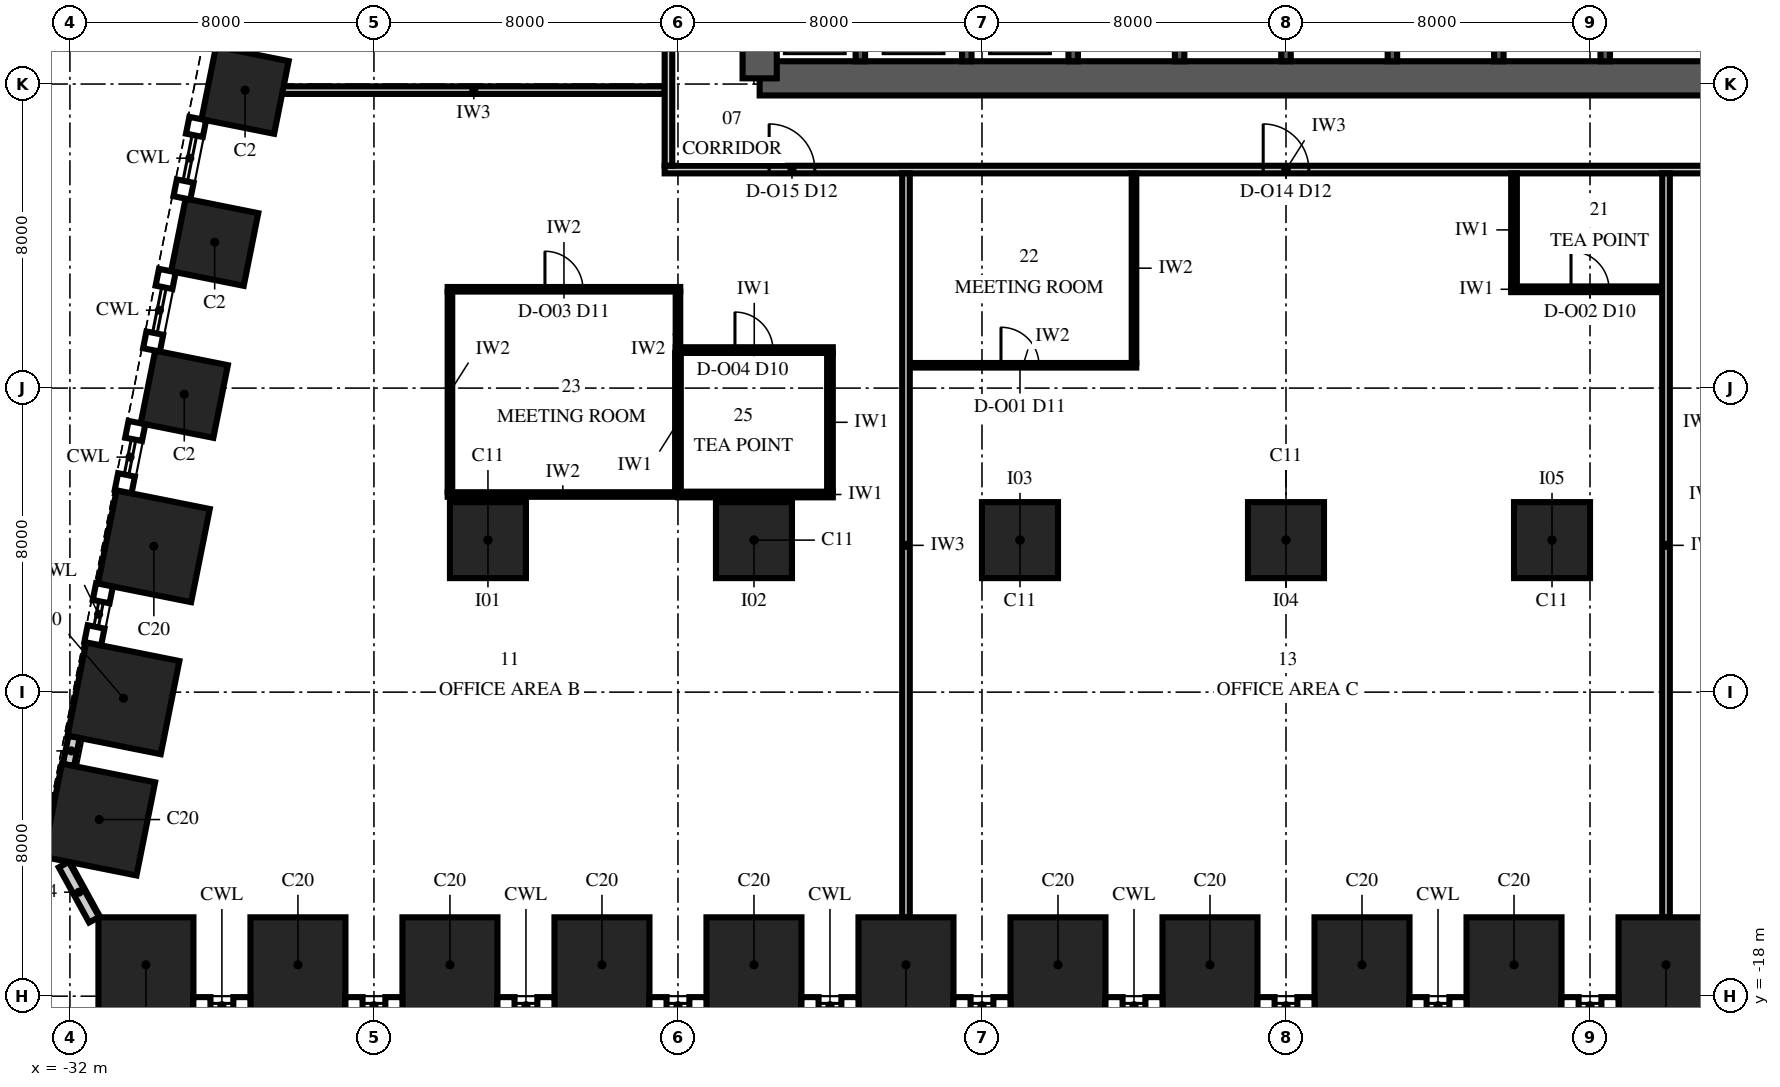
"""IFC4 building model, lengths in metres.
Left out: names, types, materials, properties, quantities, classifications, styles, units other than length and angle.
Written with IfcOpenShell. Run it as: python <this file> out.ifc"""

import sys

from ifc_helpers import new_model, si_unit, direction, frame, frame_2d, origin, origin_2d, place, context, subcontext, project, spatial, polyline, rectangle, outline, extrude, element, fill, save


model = new_model("IFC4")
c1 = context("Model", 3, precision=1e-05, world=origin(), true_north=direction((0.0, 1.0)))
c2 = subcontext(c1, "Body", "Model", "MODEL_VIEW")
j1 = project(units=[si_unit("LENGTHUNIT", "METRE"), si_unit("PLANEANGLEUNIT", "RADIAN")], contexts=[c1])
p1 = place(None, origin())
s1 = spatial("IfcSite", under=j1, at=p1, CompositionType="ELEMENT")
p2 = place(p1, origin())
s2 = spatial("IfcBuilding", under=s1, at=p2, CompositionType="ELEMENT")
p3 = place(p2, frame((0.0, 0.0, 36.0)))
s3 = spatial("IfcBuildingStorey", under=s2, at=p3, CompositionType="ELEMENT", Elevation=36.0)
for number, where, z_axis, x_axis in (
    (1, (-30.0, -17.175, 0.0), (0.0, 0.0, 1.0), (1.0, 0.0, 0.0)),
    (2, (-26.0, -17.175, 0.0), (0.0, 0.0, 1.0), (1.0, 0.0, 0.0)),
    (3, (-22.0, -17.175, 0.0), (0.0, 0.0, 1.0), (1.0, 0.0, 0.0)),
    (4, (-18.0, -17.175, 0.0), (0.0, 0.0, 1.0), (1.0, 0.0, 0.0)),
    (5, (-14.0, -17.175, 0.0), (0.0, 0.0, 1.0), (1.0, 0.0, 0.0)),
    (6, (-10.0, -17.175, 0.0), (0.0, 0.0, 1.0), (1.0, 0.0, 0.0)),
    (7, (-6.0, -17.175, 0.0), (0.0, 0.0, 1.0), (1.0, 0.0, 0.0)),
    (8, (-2.0, -17.175, 0.0), (0.0, 0.0, 1.0), (1.0, 0.0, 0.0)),
    (9, (2.0, -17.175, 0.0), (0.0, 0.0, 1.0), (1.0, 0.0, 0.0)),
    (10, (6.0, -17.175, 0.0), (0.0, 0.0, 1.0), (1.0, 0.0, 0.0)),
    (11, (10.0, -17.175, 0.0), (0.0, 0.0, 1.0), (1.0, 0.0, 0.0)),
):
    element("IfcColumn", number, at=place(p3, frame(where, z_axis=z_axis, x_axis=x_axis)), inside=s3, PredefinedType="COLUMN", context=c2, shape_type="SweptSolid", body=[
        extrude(rectangle(XDim=2.5, YDim=2.5, at=origin_2d()), origin(), (0.0, 0.0, 1.0), 4.0),
    ])
for number, where, z_axis, x_axis in (
    (12, (-27.391, 5.838, 0.0), (0.0, 0.0, 1.0), (-0.196, -0.981, 0.0)),
    (13, (-28.191, 1.838, 0.0), (0.0, 0.0, 1.0), (-0.196, -0.981, 0.0)),
    (14, (-28.991, -2.162, 0.0), (0.0, 0.0, 1.0), (-0.196, -0.981, 0.0)),
):
    element("IfcColumn", number, at=place(p3, frame(where, z_axis=z_axis, x_axis=x_axis)), inside=s3, PredefinedType="COLUMN", context=c2, shape_type="SweptSolid", body=[
        extrude(rectangle(XDim=1.95, YDim=1.95, at=origin_2d()), origin(), (0.0, 0.0, 1.0), 4.0),
    ])
for number, where, z_axis, x_axis in (
    (15, (-29.791, -6.162, 0.0), (0.0, 0.0, 1.0), (-0.196, -0.981, 0.0)),
    (16, (-30.591, -10.162, 0.0), (0.0, 0.0, 1.0), (-0.196, -0.981, 0.0)),
    (17, (-31.229, -13.353, 0.0), (0.0, 0.0, 1.0), (-0.196, -0.981, 0.0)),
):
    element("IfcColumn", number, at=place(p3, frame(where, z_axis=z_axis, x_axis=x_axis)), inside=s3, PredefinedType="COLUMN", context=c2, shape_type="SweptSolid", body=[
        extrude(rectangle(XDim=2.5, YDim=2.5, at=origin_2d()), origin(), (0.0, 0.0, 1.0), 4.0),
    ])
for number, where, z_axis, x_axis in (
    (18, (-21.0, -6.0, 0.0), (0.0, 0.0, 1.0), (1.0, 0.0, 0.0)),
    (19, (-14.0, -6.0, 0.0), (0.0, 0.0, 1.0), (1.0, 0.0, 0.0)),
    (20, (-7.0, -6.0, 0.0), (0.0, 0.0, 1.0), (1.0, 0.0, 0.0)),
    (21, (0.0, -6.0, 0.0), (0.0, 0.0, 1.0), (1.0, 0.0, 0.0)),
    (22, (7.0, -6.0, 0.0), (0.0, 0.0, 1.0), (1.0, 0.0, 0.0)),
):
    element("IfcColumn", number, at=place(p3, frame(where, z_axis=z_axis, x_axis=x_axis)), inside=s3, PredefinedType="COLUMN", context=c2, shape_type="SweptSolid", body=[
        extrude(rectangle(XDim=2.0, YDim=2.0, at=origin_2d()), origin(), (0.0, 0.0, 1.0), 4.0),
    ])
p4 = place(p3, frame((-13.85, 6.15, 0.0), z_axis=(0.0, 0.0, 1.0), x_axis=(1.0, 0.0, 0.0)))
e23 = element("IfcWall", 23, at=p4, inside=s3, PredefinedType="SHEAR", context=c2, shape_type="SweptSolid", body=[
    extrude(rectangle(XDim=27.7, YDim=0.9, at=frame_2d((13.85, 0.0))), origin(), (0.0, 0.0, 1.0), 4.0),
])
p5 = place(p3, frame((-13.85, 23.85, 0.0), z_axis=(0.0, 0.0, 1.0), x_axis=(0.0, -1.0, 0.0)))
e24 = element("IfcWall", 24, at=p5, inside=s3, PredefinedType="SHEAR", context=c2, shape_type="SweptSolid", body=[
    extrude(outline(polyline([(0.0, -0.45), (17.7, -0.45), (17.7, 0.0), (17.25, 0.0), (17.25, 0.45), (0.45, 0.45), (0.45, 0.0), (0.0, 0.0), (0.0, -0.45)])), origin(), (0.0, 0.0, 1.0), 4.0),
])
p6 = place(p5, frame((11.75, 0.0, 0.0)))
e25 = element("IfcOpeningElement", 25, at=p6, cuts=e24, PredefinedType="OPENING", context=c2, shape_type="SweptSolid", body=[
    extrude(rectangle(XDim=1.8, YDim=2.4, at=frame_2d((0.9, 1.2))), frame((0.0, 0.465, 0.0), z_axis=(0.0, -1.0, 0.0), x_axis=(1.0, 0.0, 0.0)), (0.0, 0.0, 1.0), 0.93),
])
for number, where, z_axis, x_axis in (
    (26, (-11.2, 6.6, 0.0), (0.0, 0.0, 1.0), (0.0, 1.0, 0.0)),
    (27, (-8.4, 6.6, 0.0), (0.0, 0.0, 1.0), (0.0, 1.0, 0.0)),
    (28, (-5.6, 6.6, 0.0), (0.0, 0.0, 1.0), (0.0, 1.0, 0.0)),
    (29, (-2.8, 6.6, 0.0), (0.0, 0.0, 1.0), (0.0, 1.0, 0.0)),
    (30, (0.0, 6.6, 0.0), (0.0, 0.0, 1.0), (0.0, 1.0, 0.0)),
    (31, (2.8, 6.6, 0.0), (0.0, 0.0, 1.0), (0.0, 1.0, 0.0)),
    (32, (5.6, 6.6, 0.0), (0.0, 0.0, 1.0), (0.0, 1.0, 0.0)),
    (33, (8.4, 6.6, 0.0), (0.0, 0.0, 1.0), (0.0, 1.0, 0.0)),
):
    element("IfcWall", number, at=place(p3, frame(where, z_axis=z_axis, x_axis=x_axis)), inside=s3, PredefinedType="SHEAR", context=c2, shape_type="SweptSolid", body=[
        extrude(rectangle(XDim=2.675, YDim=0.25, at=frame_2d((1.337, 0.0))), origin(), (0.0, 0.0, 1.0), 4.0),
    ])
p7 = place(p3, frame((-31.89, -11.177, 0.0), z_axis=(0.0, 0.0, 1.0), x_axis=(-0.195867092459, -0.980630451338, 0.0)))
e34 = element("IfcWall", 34, at=p7, inside=s3, PredefinedType="SOLIDWALL", context=c2, shape_type="SweptSolid", body=[
    extrude(rectangle(XDim=0.754, YDim=0.3, at=frame_2d((0.377, 0.0))), origin(), (0.0, 0.0, 1.0), 4.0),
])
p8 = place(p3, frame((-32.16, -14.539, 0.0), z_axis=(0.0, 0.0, 1.0), x_axis=(0.481879089964, -0.876237720402, 0.0)))
e35 = element("IfcWall", 35, at=p8, inside=s3, PredefinedType="SOLIDWALL", context=c2, shape_type="SweptSolid", body=[
    extrude(rectangle(XDim=1.654, YDim=0.3, at=frame_2d((0.827, 0.0))), origin(), (0.0, 0.0, 1.0), 4.0),
])
p9 = place(p3, frame((-22.06, -4.8, 0.0), z_axis=(0.0, 0.0, 1.0), x_axis=(1.0, 0.0, 0.0)))
e36 = element("IfcWall", 36, at=p9, inside=s3, PredefinedType="PARTITIONING", context=c2, shape_type="SweptSolid", body=[
    extrude(rectangle(XDim=6.06, YDim=0.12, at=frame_2d((3.03, 0.0))), origin(), (0.0, 0.0, 1.0), 3.25),
])
p10 = place(p3, frame((-16.0, -4.8, 0.0), z_axis=(0.0, 0.0, 1.0), x_axis=(1.0, 0.0, 0.0)))
e37 = element("IfcWall", 37, at=p10, inside=s3, PredefinedType="PARTITIONING", context=c2, shape_type="SweptSolid", body=[
    extrude(rectangle(XDim=4.075, YDim=0.15, at=frame_2d((2.038, 0.0))), origin(), (0.0, 0.0, 1.0), 3.25),
])
p11 = place(p3, frame((-9.9, -1.4, 0.0), z_axis=(0.0, 0.0, 1.0), x_axis=(1.0, 0.0, 0.0)))
e38 = element("IfcWall", 38, at=p11, inside=s3, PredefinedType="PARTITIONING", context=c2, shape_type="SweptSolid", body=[
    extrude(rectangle(XDim=5.96, YDim=0.12, at=frame_2d((2.98, 0.0))), origin(), (0.0, 0.0, 1.0), 3.25),
])
p12 = place(p11, frame((2.4, 0.0, 0.0)))
e39 = element("IfcOpeningElement", 39, at=p12, cuts=e38, PredefinedType="OPENING", context=c2, shape_type="SweptSolid", body=[
    extrude(rectangle(XDim=1.0, YDim=2.4, at=frame_2d((0.5, 1.2))), frame((0.0, 0.075, 0.0), z_axis=(0.0, -1.0, 0.0), x_axis=(1.0, 0.0, 0.0)), (0.0, 0.0, 1.0), 0.15),
])
p13 = place(p3, frame((-16.06, -1.0, 0.0), z_axis=(0.0, 0.0, 1.0), x_axis=(1.0, 0.0, 0.0)))
e40 = element("IfcWall", 40, at=p13, inside=s3, PredefinedType="PARTITIONING", context=c2, shape_type="SweptSolid", body=[
    extrude(rectangle(XDim=4.135, YDim=0.15, at=frame_2d((2.067, 0.0))), origin(), (0.0, 0.0, 1.0), 3.25),
])
p14 = place(p13, frame((1.56, 0.0, 0.0)))
e41 = element("IfcOpeningElement", 41, at=p14, cuts=e40, PredefinedType="OPENING", context=c2, shape_type="SweptSolid", body=[
    extrude(rectangle(XDim=1.0, YDim=2.3, at=frame_2d((0.5, 1.15))), frame((0.0, 0.09, 0.0), z_axis=(0.0, -1.0, 0.0), x_axis=(1.0, 0.0, 0.0)), (0.0, 0.0, 1.0), 0.18),
])
p15 = place(p3, frame((-22.06, 0.6, 0.0), z_axis=(0.0, 0.0, 1.0), x_axis=(1.0, 0.0, 0.0)))
e42 = element("IfcWall", 42, at=p15, inside=s3, PredefinedType="PARTITIONING", context=c2, shape_type="SweptSolid", body=[
    extrude(rectangle(XDim=6.12, YDim=0.12, at=frame_2d((3.06, 0.0))), origin(), (0.0, 0.0, 1.0), 3.25),
])
p16 = place(p15, frame((2.56, 0.0, 0.0)))
e43 = element("IfcOpeningElement", 43, at=p16, cuts=e42, PredefinedType="OPENING", context=c2, shape_type="SweptSolid", body=[
    extrude(rectangle(XDim=1.0, YDim=2.4, at=frame_2d((0.5, 1.2))), frame((0.0, 0.075, 0.0), z_axis=(0.0, -1.0, 0.0), x_axis=(1.0, 0.0, 0.0)), (0.0, 0.0, 1.0), 0.15),
])
p17 = place(p3, frame((5.925, 0.6, 0.0), z_axis=(0.0, 0.0, 1.0), x_axis=(1.0, 0.0, 0.0)))
e44 = element("IfcWall", 44, at=p17, inside=s3, PredefinedType="PARTITIONING", context=c2, shape_type="SweptSolid", body=[
    extrude(rectangle(XDim=3.975, YDim=0.15, at=frame_2d((1.987, 0.0))), origin(), (0.0, 0.0, 1.0), 3.85),
])
p18 = place(p17, frame((1.575, 0.0, 0.0)))
e45 = element("IfcOpeningElement", 45, at=p18, cuts=e44, PredefinedType="OPENING", context=c2, shape_type="SweptSolid", body=[
    extrude(rectangle(XDim=1.0, YDim=2.3, at=frame_2d((0.5, 1.15))), frame((0.0, 0.09, 0.0), z_axis=(0.0, -1.0, 0.0), x_axis=(1.0, 0.0, 0.0)), (0.0, 0.0, 1.0), 0.18),
])
p19 = place(p3, frame((-16.35, 3.75, 0.0), z_axis=(0.0, 0.0, 1.0), x_axis=(1.0, 0.0, 0.0)))
e46 = element("IfcWall", 46, at=p19, inside=s3, PredefinedType="PARTITIONING", context=c2, shape_type="SweptSolid", body=[
    extrude(rectangle(XDim=32.7, YDim=0.2, at=frame_2d((16.35, 0.0))), origin(), (0.0, 0.0, 1.0), 3.25),
])
p20 = place(p19, frame((15.75, 0.0, 0.0)))
e47 = element("IfcOpeningElement", 47, at=p20, cuts=e46, PredefinedType="OPENING", context=c2, shape_type="SweptSolid", body=[
    extrude(rectangle(XDim=1.2, YDim=2.4, at=frame_2d((0.6, 1.2))), frame((0.0, 0.115, 0.0), z_axis=(0.0, -1.0, 0.0), x_axis=(1.0, 0.0, 0.0)), (0.0, 0.0, 1.0), 0.23),
])
p21 = place(p19, frame((2.75, 0.0, 0.0)))
e48 = element("IfcOpeningElement", 48, at=p21, cuts=e46, PredefinedType="OPENING", context=c2, shape_type="SweptSolid", body=[
    extrude(rectangle(XDim=1.2, YDim=2.4, at=frame_2d((0.6, 1.2))), frame((0.0, 0.115, 0.0), z_axis=(0.0, -1.0, 0.0), x_axis=(1.0, 0.0, 0.0)), (0.0, 0.0, 1.0), 0.23),
])
p22 = place(p19, frame((28.75, 0.0, 0.0)))
e49 = element("IfcOpeningElement", 49, at=p22, cuts=e46, PredefinedType="OPENING", context=c2, shape_type="SweptSolid", body=[
    extrude(rectangle(XDim=1.2, YDim=2.4, at=frame_2d((0.6, 1.2))), frame((0.0, 0.115, 0.0), z_axis=(0.0, -1.0, 0.0), x_axis=(1.0, 0.0, 0.0)), (0.0, 0.0, 1.0), 0.23),
])
p23 = place(p3, frame((-26.396, 5.84, 0.0), z_axis=(0.0, 0.0, 1.0), x_axis=(1.0, 0.0, 0.0)))
e50 = element("IfcWall", 50, at=p23, inside=s3, PredefinedType="PARTITIONING", context=c2, shape_type="SweptSolid", body=[
    extrude(rectangle(XDim=10.046, YDim=0.2, at=frame_2d((5.023, 0.0))), origin(), (0.0, 0.0, 1.0), 2.842),
])
p24 = place(p3, frame((-22.0, -4.74, 0.0), z_axis=(0.0, 0.0, 1.0), x_axis=(0.0, 1.0, 0.0)))
e51 = element("IfcWall", 51, at=p24, inside=s3, PredefinedType="PARTITIONING", context=c2, shape_type="SweptSolid", body=[
    extrude(rectangle(XDim=5.28, YDim=0.12, at=frame_2d((2.64, 0.0))), origin(), (0.0, 0.0, 1.0), 3.25),
])
p25 = place(p3, frame((-16.25, 3.85, 0.0), z_axis=(0.0, 0.0, 1.0), x_axis=(0.0, 1.0, 0.0)))
e52 = element("IfcWall", 52, at=p25, inside=s3, PredefinedType="PARTITIONING", context=c2, shape_type="SweptSolid", body=[
    extrude(rectangle(XDim=22.3, YDim=0.2, at=frame_2d((11.15, 0.0))), origin(), (0.0, 0.0, 1.0), 2.842),
])
p26 = place(p25, frame((4.55, 0.0, 0.0)))
e53 = element("IfcOpeningElement", 53, at=p26, cuts=e52, PredefinedType="OPENING", context=c2, shape_type="SweptSolid", body=[
    extrude(rectangle(XDim=1.2, YDim=2.4, at=frame_2d((0.6, 1.2))), frame((0.0, 0.115, 0.0), z_axis=(0.0, -1.0, 0.0), x_axis=(1.0, 0.0, 0.0)), (0.0, 0.0, 1.0), 0.23),
])
p27 = place(p3, frame((-16.0, -4.725, 0.0), z_axis=(0.0, 0.0, 1.0), x_axis=(0.0, 1.0, 0.0)))
e54 = element("IfcWall", 54, at=p27, inside=s3, PredefinedType="PARTITIONING", context=c2, shape_type="SweptSolid", body=[
    extrude(rectangle(XDim=3.65, YDim=0.15, at=frame_2d((1.825, 0.0))), origin(), (0.0, 0.0, 1.0), 3.85),
])
p28 = place(p3, frame((-16.0, -0.925, 0.0), z_axis=(0.0, 0.0, 1.0), x_axis=(0.0, 1.0, 0.0)))
e55 = element("IfcWall", 55, at=p28, inside=s3, PredefinedType="PARTITIONING", context=c2, shape_type="SweptSolid", body=[
    extrude(rectangle(XDim=1.465, YDim=0.12, at=frame_2d((0.732, 0.0))), origin(), (0.0, 0.0, 1.0), 3.85),
])
p29 = place(p3, frame((-12.0, -4.725, 0.0), z_axis=(0.0, 0.0, 1.0), x_axis=(0.0, 1.0, 0.0)))
e56 = element("IfcWall", 56, at=p29, inside=s3, PredefinedType="PARTITIONING", context=c2, shape_type="SweptSolid", body=[
    extrude(rectangle(XDim=3.65, YDim=0.15, at=frame_2d((1.825, 0.0))), origin(), (0.0, 0.0, 1.0), 3.85),
])
p30 = place(p3, frame((-10.0, -15.925, 0.0), z_axis=(0.0, 0.0, 1.0), x_axis=(0.0, 1.0, 0.0)))
e57 = element("IfcWall", 57, at=p30, inside=s3, PredefinedType="PARTITIONING", context=c2, shape_type="SweptSolid", body=[
    extrude(rectangle(XDim=19.575, YDim=0.2, at=frame_2d((9.788, 0.0))), origin(), (0.0, 0.0, 1.0), 2.842),
])
p31 = place(p3, frame((-4.0, -1.34, 0.0), z_axis=(0.0, 0.0, 1.0), x_axis=(0.0, 1.0, 0.0)))
e58 = element("IfcWall", 58, at=p31, inside=s3, PredefinedType="PARTITIONING", context=c2, shape_type="SweptSolid", body=[
    extrude(rectangle(XDim=4.99, YDim=0.12, at=frame_2d((2.495, 0.0))), origin(), (0.0, 0.0, 1.0), 3.85),
])
p32 = place(p3, frame((6.0, 0.675, 0.0), z_axis=(0.0, 0.0, 1.0), x_axis=(0.0, 1.0, 0.0)))
e59 = element("IfcWall", 59, at=p32, inside=s3, PredefinedType="PARTITIONING", context=c2, shape_type="SweptSolid", body=[
    extrude(rectangle(XDim=2.975, YDim=0.15, at=frame_2d((1.487, 0.0))), origin(), (0.0, 0.0, 1.0), 3.85),
])
p33 = place(p3, frame((10.0, -15.925, 0.0), z_axis=(0.0, 0.0, 1.0), x_axis=(0.0, 1.0, 0.0)))
e60 = element("IfcWall", 60, at=p33, inside=s3, PredefinedType="PARTITIONING", context=c2, shape_type="SweptSolid", body=[
    extrude(rectangle(XDim=19.575, YDim=0.2, at=frame_2d((9.788, 0.0))), origin(), (0.0, 0.0, 1.0), 2.842),
])
p34 = place(p12, origin())
e61 = element("IfcDoor", 61, at=p34, inside=s3, OperationType="SINGLE_SWING_RIGHT", PredefinedType="DOOR", context=c2, shape_type="SweptSolid", body=[
    extrude(rectangle(XDim=1.0, YDim=2.4, at=frame_2d((0.5, 1.2))), frame((0.0, 0.06, 0.0), z_axis=(0.0, -1.0, 0.0), x_axis=(1.0, 0.0, 0.0)), (0.0, 0.0, 1.0), 0.12),
])
fill(e39, e61)
p35 = place(p18, origin())
e62 = element("IfcDoor", 62, at=p35, inside=s3, OperationType="SINGLE_SWING_LEFT", PredefinedType="DOOR", context=c2, shape_type="SweptSolid", body=[
    extrude(rectangle(XDim=1.0, YDim=2.3, at=frame_2d((0.5, 1.15))), frame((0.0, 0.075, 0.0), z_axis=(0.0, -1.0, 0.0), x_axis=(1.0, 0.0, 0.0)), (0.0, 0.0, 1.0), 0.149),
])
fill(e45, e62)
p36 = place(p16, origin())
e63 = element("IfcDoor", 63, at=p36, inside=s3, OperationType="SINGLE_SWING_RIGHT", PredefinedType="DOOR", context=c2, shape_type="SweptSolid", body=[
    extrude(rectangle(XDim=1.0, YDim=2.4, at=frame_2d((0.5, 1.2))), frame((0.0, 0.06, 0.0), z_axis=(0.0, -1.0, 0.0), x_axis=(1.0, 0.0, 0.0)), (0.0, 0.0, 1.0), 0.12),
])
fill(e43, e63)
p37 = place(p14, origin())
e64 = element("IfcDoor", 64, at=p37, inside=s3, OperationType="SINGLE_SWING_LEFT", PredefinedType="DOOR", context=c2, shape_type="SweptSolid", body=[
    extrude(rectangle(XDim=1.0, YDim=2.3, at=frame_2d((0.5, 1.15))), frame((0.0, 0.075, 0.0), z_axis=(0.0, -1.0, 0.0), x_axis=(1.0, 0.0, 0.0)), (0.0, 0.0, 1.0), 0.149),
])
fill(e41, e64)
p38 = place(p20, origin())
e65 = element("IfcDoor", 65, at=p38, inside=s3, OperationType="SINGLE_SWING_LEFT", PredefinedType="DOOR", context=c2, shape_type="SweptSolid", body=[
    extrude(rectangle(XDim=1.2, YDim=2.4, at=frame_2d((0.6, 1.2))), frame((0.0, 0.1, 0.0), z_axis=(0.0, -1.0, 0.0), x_axis=(1.0, 0.0, 0.0)), (0.0, 0.0, 1.0), 0.199),
])
fill(e47, e65)
p39 = place(p21, origin())
e66 = element("IfcDoor", 66, at=p39, inside=s3, OperationType="SINGLE_SWING_LEFT", PredefinedType="DOOR", context=c2, shape_type="SweptSolid", body=[
    extrude(rectangle(XDim=1.2, YDim=2.4, at=frame_2d((0.6, 1.2))), frame((0.0, 0.1, 0.0), z_axis=(0.0, -1.0, 0.0), x_axis=(1.0, 0.0, 0.0)), (0.0, 0.0, 1.0), 0.199),
])
fill(e48, e66)
save(model, sys.argv[1])
